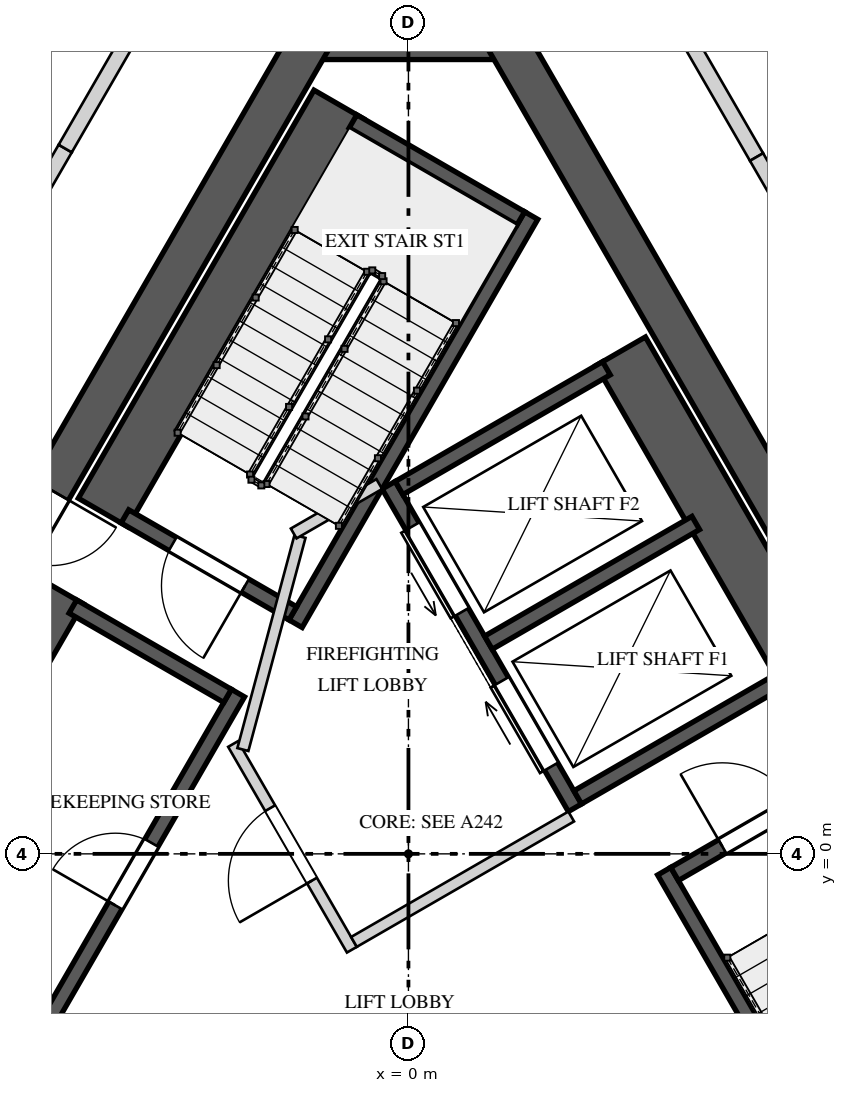
"""IFC4 building model, lengths in metres.
Left out: names, types, materials, properties, quantities, classifications, styles, units other than length and angle.
Written with IfcOpenShell. Run it as: python <this file> out.ifc"""

import sys

from ifc_helpers import new_model, si_unit, direction, frame, frame_2d, origin, place, context, subcontext, project, spatial, rectangle, extrude, element, fill, save


model = new_model("IFC4")
c1 = context("Model", 3, precision=1e-05, world=origin(), true_north=direction((0.0, 1.0)))
c2 = subcontext(c1, "Body", "Model", "MODEL_VIEW")
j1 = project(units=[si_unit("LENGTHUNIT", "METRE"), si_unit("PLANEANGLEUNIT", "RADIAN")], contexts=[c1])
p1 = place(None, origin())
s1 = spatial("IfcSite", under=j1, at=p1, CompositionType="ELEMENT")
p2 = place(p1, origin())
s2 = spatial("IfcBuilding", under=s1, at=p2, CompositionType="ELEMENT")
p3 = place(p2, frame((0.0, 0.0, 320.4)))
s3 = spatial("IfcBuildingStorey", under=s2, at=p3, CompositionType="ELEMENT", Elevation=320.4)
p4 = place(p3, frame((1.443, 10.725, 0.0), z_axis=(0.0, 0.0, 1.0), x_axis=(-1.0, 0.0, 0.0)))
e1 = element("IfcWall", 1, at=p4, inside=s3, PredefinedType="SHEAR", context=c2, shape_type="SweptSolid", body=[
    extrude(rectangle(XDim=2.887, YDim=0.55, at=frame_2d((1.443, 0.0))), origin(), (0.0, 0.0, 1.0), 4.0),
])
p5 = place(p3, frame((-1.285, 10.725, 0.0), z_axis=(0.0, 0.0, 1.0), x_axis=(-0.499994590896, -0.86602852671, 0.0)))
e2 = element("IfcWall", 2, at=p5, inside=s3, PredefinedType="SHEAR", context=c2, shape_type="SweptSolid", body=[
    extrude(rectangle(XDim=17.292, YDim=0.55, at=frame_2d((8.646, 0.0))), origin(), (0.0, 0.0, 1.0), 4.0),
])
p6 = place(p5, frame((6.851, 0.0, 0.0)))
e3 = element("IfcOpeningElement", 3, at=p6, cuts=e2, PredefinedType="OPENING", context=c2, shape_type="SweptSolid", body=[
    extrude(rectangle(XDim=1.0, YDim=2.4, at=frame_2d((0.5, 1.2))), frame((0.0, 0.285, 0.0), z_axis=(0.0, -1.0, 0.0), x_axis=(1.0, 0.0, 0.0)), (0.0, 0.0, 1.0), 0.57),
])
p7 = place(p5, frame((15.089, 0.0, 0.0)))
e4 = element("IfcOpeningElement", 4, at=p7, cuts=e2, PredefinedType="OPENING", context=c2, shape_type="SweptSolid", body=[
    extrude(rectangle(XDim=0.8, YDim=2.1, at=frame_2d((0.4, 1.05))), frame((0.0, 0.285, 0.0), z_axis=(0.0, -1.0, 0.0), x_axis=(1.0, 0.0, 0.0)), (0.0, 0.0, 1.0), 0.57),
])
p8 = place(p3, frame((9.93, -4.25, 0.0), z_axis=(0.0, 0.0, 1.0), x_axis=(-0.499994590896, 0.86602852671, 0.0)))
e5 = element("IfcWall", 5, at=p8, inside=s3, PredefinedType="SHEAR", context=c2, shape_type="SweptSolid", body=[
    extrude(rectangle(XDim=17.292, YDim=0.55, at=frame_2d((8.646, 0.0))), origin(), (0.0, 0.0, 1.0), 4.0),
])
p9 = place(p8, frame((6.921, 0.0, 0.0)))
e6 = element("IfcOpeningElement", 6, at=p9, cuts=e5, PredefinedType="OPENING", context=c2, shape_type="SweptSolid", body=[
    extrude(rectangle(XDim=1.0, YDim=2.4, at=frame_2d((0.5, 1.2))), frame((0.0, 0.285, 0.0), z_axis=(0.0, -1.0, 0.0), x_axis=(1.0, 0.0, 0.0)), (0.0, 0.0, 1.0), 0.57),
])
p10 = place(p3, frame((-0.918, 9.86, 0.0), z_axis=(0.0, 0.0, 1.0), x_axis=(-0.500026960575, -0.86600983753, 0.0)))
e7 = element("IfcWall", 7, at=p10, inside=s3, PredefinedType="SOLIDWALL", context=c2, shape_type="SweptSolid", body=[
    extrude(rectangle(XDim=6.2, YDim=0.75, at=frame_2d((3.1, 0.0))), origin(), (0.0, 0.0, 1.0), 3.65),
])
p11 = place(p3, frame((1.615, 8.397, 0.0), z_axis=(0.0, 0.0, 1.0), x_axis=(-0.500009909098, -0.866019682689, 0.0)))
e8 = element("IfcWall", 8, at=p11, inside=s3, PredefinedType="SOLIDWALL", context=c2, shape_type="SweptSolid", body=[
    extrude(rectangle(XDim=6.2, YDim=0.2, at=frame_2d((3.1, 0.0))), origin(), (0.0, 0.0, 1.0), 3.65),
])
p12 = place(p3, frame((1.479, 8.361, 0.0), z_axis=(0.0, 0.0, 1.0), x_axis=(-0.865989465428, 0.500062241894, 0.0)))
e9 = element("IfcWall", 9, at=p12, inside=s3, PredefinedType="SOLIDWALL", context=c2, shape_type="SweptSolid", body=[
    extrude(rectangle(XDim=2.55, YDim=0.2, at=frame_2d((1.275, 0.0))), origin(), (0.0, 0.0, 1.0), 3.65),
])
p13 = place(p3, frame((-1.521, 3.165, 0.0), z_axis=(0.0, 0.0, 1.0), x_axis=(-0.866030925526, 0.499990435942, 0.0)))
e10 = element("IfcWall", 10, at=p13, inside=s3, PredefinedType="SOLIDWALL", context=c2, shape_type="SweptSolid", body=[
    extrude(rectangle(XDim=2.55, YDim=0.2, at=frame_2d((1.275, 0.0))), origin(), (0.0, 0.0, 1.0), 3.65),
])
p14 = place(p13, frame((0.725, 0.0, 0.0)))
e11 = element("IfcOpeningElement", 11, at=p14, cuts=e10, PredefinedType="OPENING", context=c2, shape_type="SweptSolid", body=[
    extrude(rectangle(XDim=1.1, YDim=2.4, at=frame_2d((0.55, 1.2))), frame((0.0, 0.11, 0.0), z_axis=(0.0, -1.0, 0.0), x_axis=(1.0, 0.0, 0.0)), (0.0, 0.0, 1.0), 0.22),
])
p15 = place(p3, frame((6.465, -5.597, 0.0), z_axis=(0.0, 0.0, 1.0), x_axis=(-0.49998037582, 0.866036733513, 0.0)))
e12 = element("IfcWall", 12, at=p15, inside=s3, PredefinedType="SOLIDWALL", context=c2, shape_type="SweptSolid", body=[
    extrude(rectangle(XDim=6.2, YDim=0.2, at=frame_2d((3.1, 0.0))), origin(), (0.0, 0.0, 1.0), 3.65),
])
p16 = place(p3, frame((3.501, -0.265, 0.0), z_axis=(0.0, 0.0, 1.0), x_axis=(0.866030925526, 0.499990435942, 0.0)))
e13 = element("IfcWall", 13, at=p16, inside=s3, PredefinedType="SOLIDWALL", context=c2, shape_type="SweptSolid", body=[
    extrude(rectangle(XDim=2.55, YDim=0.2, at=frame_2d((1.275, 0.0))), origin(), (0.0, 0.0, 1.0), 3.65),
])
p17 = place(p16, frame((0.725, 0.0, 0.0)))
e14 = element("IfcOpeningElement", 14, at=p17, cuts=e13, PredefinedType="OPENING", context=c2, shape_type="SweptSolid", body=[
    extrude(rectangle(XDim=1.1, YDim=2.4, at=frame_2d((0.55, 1.2))), frame((0.0, 0.11, 0.0), z_axis=(0.0, -1.0, 0.0), x_axis=(1.0, 0.0, 0.0)), (0.0, 0.0, 1.0), 0.22),
])
p18 = place(p3, frame((-4.993, -2.648, 0.0), z_axis=(0.0, 0.0, 1.0), x_axis=(0.499996545922, 0.866027397988, 0.0)))
e15 = element("IfcWall", 15, at=p18, inside=s3, PredefinedType="SOLIDWALL", context=c2, shape_type="SweptSolid", body=[
    extrude(rectangle(XDim=5.5, YDim=0.2, at=frame_2d((2.75, 0.0))), origin(), (0.0, 0.0, 1.0), 3.65),
])
p19 = place(p18, frame((2.275, 0.0, 0.0)))
e16 = element("IfcOpeningElement", 16, at=p19, cuts=e15, PredefinedType="OPENING", context=c2, shape_type="SweptSolid", body=[
    extrude(rectangle(XDim=0.95, YDim=2.4, at=frame_2d((0.475, 1.2))), frame((0.0, 0.11, 0.0), z_axis=(0.0, -1.0, 0.0), x_axis=(1.0, 0.0, 0.0)), (0.0, 0.0, 1.0), 0.22),
])
p20 = place(p3, frame((-4.603, 3.477, 0.0), z_axis=(0.0, 0.0, 1.0), x_axis=(-0.500015767406, -0.866016300277, 0.0)))
e17 = element("IfcWall", 17, at=p20, inside=s3, PredefinedType="SOLIDWALL", context=c2, shape_type="SweptSolid", body=[
    extrude(rectangle(XDim=5.5, YDim=0.75, at=frame_2d((2.75, 0.0))), origin(), (0.0, 0.0, 1.0), 3.65),
])
p21 = place(p3, frame((-2.38, 2.078, 0.0), z_axis=(0.0, 0.0, 1.0), x_axis=(-0.866061024631, 0.499938297808, 0.0)))
e18 = element("IfcWall", 18, at=p21, inside=s3, PredefinedType="SOLIDWALL", context=c2, shape_type="SweptSolid", body=[
    extrude(rectangle(XDim=2.35, YDim=0.2, at=frame_2d((1.175, 0.0))), origin(), (0.0, 0.0, 1.0), 3.65),
])
p22 = place(p3, frame((2.19, 0.606, 0.0), z_axis=(0.0, 0.0, 1.0), x_axis=(-0.500002801628, 0.866023786258, 0.0)))
e19 = element("IfcWall", 19, at=p22, inside=s3, PredefinedType="SOLIDWALL", context=c2, shape_type="SweptSolid", body=[
    extrude(rectangle(XDim=4.9, YDim=0.2, at=frame_2d((2.45, 0.0))), origin(), (0.0, 0.0, 1.0), 3.65),
])
p23 = place(p22, frame((0.625, 0.0, 0.0)))
e20 = element("IfcOpeningElement", 20, at=p23, cuts=e19, PredefinedType="OPENING", context=c2, shape_type="SweptSolid", body=[
    extrude(rectangle(XDim=1.3, YDim=2.1, at=frame_2d((0.65, 1.05))), frame((0.0, 0.11, 0.0), z_axis=(0.0, -1.0, 0.0), x_axis=(1.0, 0.0, 0.0)), (0.0, 0.0, 1.0), 0.22),
])
p24 = place(p22, frame((2.975, 0.0, 0.0)))
e21 = element("IfcOpeningElement", 21, at=p24, cuts=e19, PredefinedType="OPENING", context=c2, shape_type="SweptSolid", body=[
    extrude(rectangle(XDim=1.3, YDim=2.1, at=frame_2d((0.65, 1.05))), frame((0.0, 0.11, 0.0), z_axis=(0.0, -1.0, 0.0), x_axis=(1.0, 0.0, 0.0)), (0.0, 0.0, 1.0), 0.22),
])
p25 = place(p3, frame((5.243, 2.369, 0.0), z_axis=(0.0, 0.0, 1.0), x_axis=(-0.500002801628, 0.866023786258, 0.0)))
e22 = element("IfcWall", 22, at=p25, inside=s3, PredefinedType="SOLIDWALL", context=c2, shape_type="SweptSolid", body=[
    extrude(rectangle(XDim=4.9, YDim=0.75, at=frame_2d((2.45, 0.0))), origin(), (0.0, 0.0, 1.0), 3.65),
])
for number, where, z_axis, x_axis in (
    (23, (2.227, 0.743, 0.0), (0.0, 0.0, 1.0), (0.866, 0.5, 0.0)),
    (24, (1.052, 2.778, 0.0), (0.0, 0.0, 1.0), (0.866, 0.5, 0.0)),
    (25, (-0.123, 4.813, 0.0), (0.0, 0.0, 1.0), (0.866, 0.5, 0.0)),
):
    element("IfcWall", number, at=place(p3, frame(where, z_axis=z_axis, x_axis=x_axis)), inside=s3, PredefinedType="SOLIDWALL", context=c2, shape_type="SweptSolid", body=[
        extrude(rectangle(XDim=3.15, YDim=0.2, at=frame_2d((1.575, 0.0))), origin(), (0.0, 0.0, 1.0), 3.65),
    ])
p26 = place(p3, frame((-0.744, -1.261, 0.0), z_axis=(0.0, 0.0, 1.0), x_axis=(-0.500004234368, 0.866022959057, 0.0)))
e26 = element("IfcWall", 26, at=p26, inside=s3, PredefinedType="PARTITIONING", context=c2, shape_type="SweptSolid", body=[
    extrude(rectangle(XDim=3.125, YDim=0.15, at=frame_2d((1.562, 0.0))), origin(), (0.0, 0.0, 1.0), 3.65),
])
p27 = place(p26, frame((1.05, 0.0, 0.0)))
e27 = element("IfcOpeningElement", 27, at=p27, cuts=e26, PredefinedType="OPENING", context=c2, shape_type="SweptSolid", body=[
    extrude(rectangle(XDim=1.1, YDim=2.4, at=frame_2d((0.55, 1.2))), frame((0.0, 0.085, 0.0), z_axis=(0.0, -1.0, 0.0), x_axis=(1.0, 0.0, 0.0)), (0.0, 0.0, 1.0), 0.17),
])
p28 = place(p3, frame((-0.717, -1.159, 0.0), z_axis=(0.0, 0.0, 1.0), x_axis=(0.866008176907, 0.50002983664, 0.0)))
e28 = element("IfcWall", 28, at=p28, inside=s3, PredefinedType="PARTITIONING", context=c2, shape_type="SweptSolid", body=[
    extrude(rectangle(XDim=3.3, YDim=0.15, at=frame_2d((1.65, 0.0))), origin(), (0.0, 0.0, 1.0), 3.65),
])
p29 = place(p3, frame((-2.178, 1.372, 0.0), z_axis=(0.0, 0.0, 1.0), x_axis=(0.258808958833, 0.96592852884, 0.0)))
e29 = element("IfcWall", 29, at=p29, inside=s3, PredefinedType="PARTITIONING", context=c2, shape_type="SweptSolid", body=[
    extrude(rectangle(XDim=2.903, YDim=0.15, at=frame_2d((1.451, 0.0))), origin(), (0.0, 0.0, 1.0), 3.65),
])
p30 = place(p3, frame((-1.51, 4.215, 0.0), z_axis=(0.0, 0.0, 1.0), x_axis=(0.866085525409, 0.49989585183, 0.0)))
e30 = element("IfcWall", 30, at=p30, inside=s3, PredefinedType="PARTITIONING", context=c2, shape_type="SweptSolid", body=[
    extrude(rectangle(XDim=1.3, YDim=0.15, at=frame_2d((0.65, 0.0))), origin(), (0.0, 0.0, 1.0), 3.65),
])
p31 = place(p3, frame((3.262, 14.15, 0.0), z_axis=(0.0, 0.0, 1.0), x_axis=(0.500032238466, -0.866006790097, 0.0)))
e31 = element("IfcWall", 31, at=p31, inside=s3, PredefinedType="PARTITIONING", context=c2, shape_type="SweptSolid", body=[
    extrude(rectangle(XDim=4.161, YDim=0.15, at=frame_2d((2.081, 0.0))), origin(), (0.0, 0.0, 1.0), 3.65),
])
p32 = place(p31, frame((1.941, 0.0, 0.0)))
e32 = element("IfcOpeningElement", 32, at=p32, cuts=e31, PredefinedType="OPENING", context=c2, shape_type="SweptSolid", body=[
    extrude(rectangle(XDim=0.95, YDim=2.4, at=frame_2d((0.475, 1.2))), frame((0.0, 0.085, 0.0), z_axis=(0.0, -1.0, 0.0), x_axis=(1.0, 0.0, 0.0)), (0.0, 0.0, 1.0), 0.17),
])
p33 = place(p3, frame((-4.929, 8.563, 0.0), z_axis=(0.0, 0.0, 1.0), x_axis=(0.500046299512, 0.865998671098, 0.0)))
e33 = element("IfcWall", 33, at=p33, inside=s3, PredefinedType="SOLIDWALL", context=c2, shape_type="SweptSolid", body=[
    extrude(rectangle(XDim=0.827, YDim=0.2, at=frame_2d((0.413, 0.0))), origin(), (0.0, 0.0, 1.0), 2.95),
])
p34 = place(p3, frame((-4.515, 9.279, 0.0), z_axis=(0.0, 0.0, 1.0), x_axis=(0.499975428181, 0.866039589866, 0.0)))
e34 = element("IfcWall", 34, at=p34, inside=s3, PredefinedType="SOLIDWALL", context=c2, shape_type="SweptSolid", body=[
    extrude(rectangle(XDim=4.066, YDim=0.2, at=frame_2d((2.033, 0.0))), origin(), (0.0, 0.0, 1.0), 3.65),
])
p35 = place(p3, frame((2.483, 12.8, 0.0), z_axis=(0.0, 0.0, 1.0), x_axis=(0.499982771656, -0.866035350345, 0.0)))
e35 = element("IfcWall", 35, at=p35, inside=s3, PredefinedType="SOLIDWALL", context=c2, shape_type="SweptSolid", body=[
    extrude(rectangle(XDim=4.195, YDim=0.2, at=frame_2d((2.097, 0.0))), origin(), (0.0, 0.0, 1.0), 3.65),
])
p36 = place(p3, frame((4.58, 9.167, 0.0), z_axis=(0.0, 0.0, 1.0), x_axis=(0.499945576647, -0.866056822842, 0.0)))
e36 = element("IfcWall", 36, at=p36, inside=s3, PredefinedType="SOLIDWALL", context=c2, shape_type="SweptSolid", body=[
    extrude(rectangle(XDim=0.821, YDim=0.2, at=frame_2d((0.41, 0.0))), origin(), (0.0, 0.0, 1.0), 2.95),
])
p37 = place(p14, origin())
e37 = element("IfcDoor", 37, at=p37, inside=s3, OperationType="SINGLE_SWING_RIGHT", PredefinedType="DOOR", context=c2, shape_type="SweptSolid", body=[
    extrude(rectangle(XDim=1.1, YDim=2.4, at=frame_2d((0.55, 1.2))), frame((0.0, 0.025, 0.0), z_axis=(0.0, -1.0, 0.0), x_axis=(1.0, 0.0, 0.0)), (0.0, 0.0, 1.0), 0.05),
])
fill(e11, e37)
p38 = place(p17, origin())
e38 = element("IfcDoor", 38, at=p38, inside=s3, OperationType="SINGLE_SWING_RIGHT", PredefinedType="DOOR", context=c2, shape_type="SweptSolid", body=[
    extrude(rectangle(XDim=1.1, YDim=2.4, at=frame_2d((0.55, 1.2))), frame((0.0, 0.025, 0.0), z_axis=(0.0, -1.0, 0.0), x_axis=(1.0, 0.0, 0.0)), (0.0, 0.0, 1.0), 0.05),
])
fill(e14, e38)
p39 = place(p19, origin())
e39 = element("IfcDoor", 39, at=p39, inside=s3, OperationType="SINGLE_SWING_LEFT", PredefinedType="DOOR", context=c2, shape_type="SweptSolid", body=[
    extrude(rectangle(XDim=0.95, YDim=2.4, at=frame_2d((0.475, 1.2))), frame((0.0, 0.025, 0.0), z_axis=(0.0, -1.0, 0.0), x_axis=(1.0, 0.0, 0.0)), (0.0, 0.0, 1.0), 0.05),
])
fill(e16, e39)
p40 = place(p23, origin())
e40 = element("IfcDoor", 40, at=p40, inside=s3, OperationType="SLIDING_TO_RIGHT", PredefinedType="DOOR", context=c2, shape_type="SweptSolid", body=[
    extrude(rectangle(XDim=1.3, YDim=2.1, at=frame_2d((0.65, 1.05))), frame((0.0, 0.025, 0.0), z_axis=(0.0, -1.0, 0.0), x_axis=(1.0, 0.0, 0.0)), (0.0, 0.0, 1.0), 0.05),
])
fill(e20, e40)
p41 = place(p24, origin())
e41 = element("IfcDoor", 41, at=p41, inside=s3, OperationType="SLIDING_TO_LEFT", PredefinedType="DOOR", context=c2, shape_type="SweptSolid", body=[
    extrude(rectangle(XDim=1.3, YDim=2.1, at=frame_2d((0.65, 1.05))), frame((0.0, 0.025, 0.0), z_axis=(0.0, -1.0, 0.0), x_axis=(1.0, 0.0, 0.0)), (0.0, 0.0, 1.0), 0.05),
])
fill(e21, e41)
p42 = place(p27, origin())
e42 = element("IfcDoor", 42, at=p42, inside=s3, OperationType="SINGLE_SWING_RIGHT", PredefinedType="DOOR", context=c2, shape_type="SweptSolid", body=[
    extrude(rectangle(XDim=1.1, YDim=2.4, at=frame_2d((0.55, 1.2))), frame((0.0, 0.025, 0.0), z_axis=(0.0, -1.0, 0.0), x_axis=(1.0, 0.0, 0.0)), (0.0, 0.0, 1.0), 0.05),
])
fill(e27, e42)
save(model, sys.argv[1])
